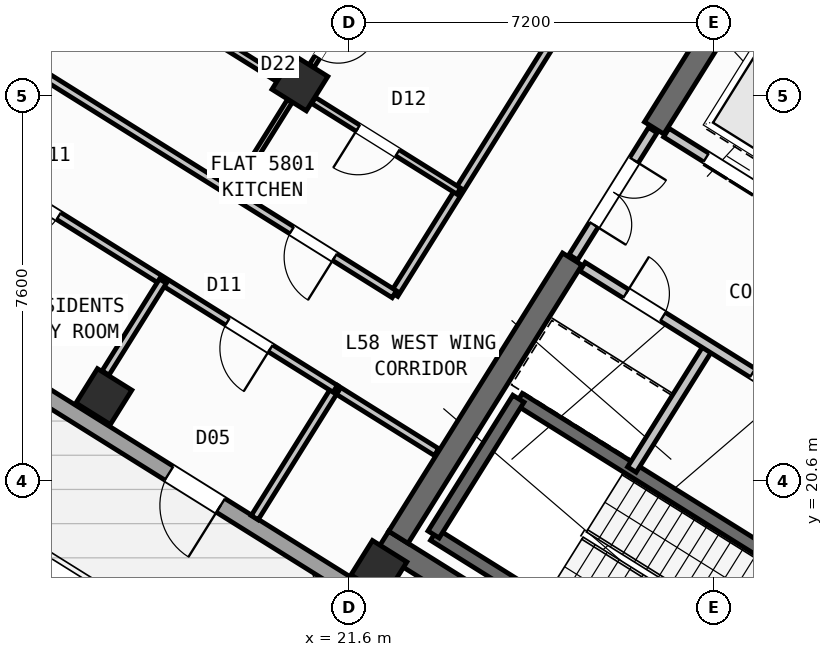
"""IFC4 building model, lengths in metres.
Left out: names, types, materials, properties, quantities, classifications, styles, units other than length and angle.
Written with IfcOpenShell. Run it as: python <this file> out.ifc"""

import sys

from ifc_helpers import new_model, si_unit, direction, frame, frame_2d, origin, origin_2d, place, context, subcontext, project, spatial, rectangle, hollow_rectangle, extrude, source, transform, mapped, element, fill, save


model = new_model("IFC4")
c1 = context("Model", 3, precision=1e-05, world=origin(), true_north=direction((0.0, 1.0)))
c2 = subcontext(c1, "Body", "Model", "MODEL_VIEW")
j1 = project(units=[si_unit("LENGTHUNIT", "METRE"), si_unit("PLANEANGLEUNIT", "RADIAN")], contexts=[c1])
p1 = place(None, origin())
s1 = spatial("IfcSite", under=j1, at=p1, CompositionType="ELEMENT")
p2 = place(p1, origin())
s2 = spatial("IfcBuilding", under=s1, at=p2, CompositionType="ELEMENT")
p3 = place(p2, frame((0.0, 0.0, 229.2)))
s3 = spatial("IfcBuildingStorey", under=s2, at=p3, CompositionType="ELEMENT", Elevation=229.2)
p4 = place(p3, frame((40.531, 24.036, 0.0), z_axis=(0.0, 0.0, 1.0), x_axis=(-0.848048787466, 0.529918157905, 0.0)))
e1 = element("IfcWall", 1, at=p4, inside=s3, PredefinedType="SHEAR", context=c2, shape_type="SweptSolid", body=[
    extrude(rectangle(XDim=13.04, YDim=0.45, at=frame_2d((6.52, 0.0))), origin(), (0.0, 0.0, 1.0), 4.22),
])
p5 = place(p3, frame((33.324, 12.503, 0.0), z_axis=(0.0, 0.0, 1.0), x_axis=(-0.848043529849, 0.529926571782, 0.0)))
e2 = element("IfcWall", 2, at=p5, inside=s3, PredefinedType="SHEAR", context=c2, shape_type="SweptSolid", body=[
    extrude(rectangle(XDim=13.04, YDim=0.45, at=frame_2d((6.52, 0.0))), origin(), (0.0, 0.0, 1.0), 4.22),
])
p6 = place(p3, frame((29.544, 30.636, 0.0), z_axis=(0.0, 0.0, 1.0), x_axis=(-0.529902075036, -0.848058836916, 0.0)))
e3 = element("IfcWall", 3, at=p6, inside=s3, PredefinedType="SHEAR", context=c2, shape_type="SweptSolid", body=[
    extrude(rectangle(XDim=3.625, YDim=0.45, at=frame_2d((1.812, 0.0))), origin(), (0.0, 0.0, 1.0), 4.22),
])
p7 = place(p3, frame((26.007, 24.976, 0.0), z_axis=(0.0, 0.0, 1.0), x_axis=(-0.529931155655, -0.848040665456, 0.0)))
e4 = element("IfcWall", 4, at=p7, inside=s3, PredefinedType="SHEAR", context=c2, shape_type="SweptSolid", body=[
    extrude(rectangle(XDim=6.475, YDim=0.45, at=frame_2d((3.238, 0.0))), origin(), (0.0, 0.0, 1.0), 4.22),
])
m1 = source(origin(), c2, "Body", "SweptSolid", [
    extrude(hollow_rectangle(XDim=0.8, YDim=0.8, WallThickness=0.032, at=origin_2d()), origin(), (0.0, 0.0, 1.0), 4.5),
])
for number, where, z_axis, x_axis in (
    (5, (22.191, 18.87, 0.0), (0.0, 0.0, 1.0), (-0.848, 0.53, 0.0)),
    (6, (20.632, 28.452, 0.0), (0.0, 0.0, 1.0), (-0.848, 0.53, 0.0)),
    (7, (16.764, 22.261, 0.0), (0.0, 0.0, 1.0), (-0.848, 0.53, 0.0)),
):
    element("IfcColumn", number, at=place(p3, frame(where, z_axis=z_axis, x_axis=x_axis)), inside=s3, PredefinedType="COLUMN", context=c2, shape_type="MappedRepresentation", body=[
        mapped(m1, transform((0.0, 0.0, 0.0), scale=1.0)),
    ])
p8 = place(p3, frame((31.76, 12.183, 0.0), z_axis=(0.0, 0.0, 1.0), x_axis=(-0.848047074256, 0.529920899612, 0.0)))
e8 = element("IfcWall", 8, at=p8, inside=s3, PredefinedType="STANDARD", context=c2, shape_type="SweptSolid", body=[
    extrude(rectangle(XDim=30.652, YDim=0.32, at=frame_2d((15.326, 0.0))), origin(), (0.0, 0.0, 1.0), 4.22),
])
p9 = place(p8, frame((14.966, 0.0, 0.0)))
e9 = element("IfcOpeningElement", 9, at=p9, cuts=e8, PredefinedType="OPENING", context=c2, shape_type="SweptSolid", body=[
    extrude(rectangle(XDim=1.2, YDim=2.15, at=frame_2d((0.6, 1.075))), frame((0.0, 0.17, 0.0), z_axis=(0.0, -1.0, 0.0), x_axis=(1.0, 0.0, 0.0)), (0.0, 0.0, 1.0), 0.34),
])
p10 = place(p8, frame((2.096, 0.0, 0.9)))
e10 = element("IfcOpeningElement", 10, at=p10, cuts=e8, PredefinedType="OPENING", context=c2, shape_type="SweptSolid", body=[
    extrude(rectangle(XDim=1.65, YDim=1.45, at=frame_2d((0.825, 0.725))), frame((0.0, 0.17, 0.0), z_axis=(0.0, -1.0, 0.0), x_axis=(1.0, 0.0, 0.0)), (0.0, 0.0, 1.0), 0.34),
])
p11 = place(p8, frame((6.771, 0.0, 0.9)))
e11 = element("IfcOpeningElement", 11, at=p11, cuts=e8, PredefinedType="OPENING", context=c2, shape_type="SweptSolid", body=[
    extrude(rectangle(XDim=1.65, YDim=1.45, at=frame_2d((0.825, 0.725))), frame((0.0, 0.17, 0.0), z_axis=(0.0, -1.0, 0.0), x_axis=(1.0, 0.0, 0.0)), (0.0, 0.0, 1.0), 0.34),
])
p12 = place(p8, frame((20.283, 0.0, 0.95)))
e12 = element("IfcOpeningElement", 12, at=p12, cuts=e8, PredefinedType="OPENING", context=c2, shape_type="SweptSolid", body=[
    extrude(rectangle(XDim=1.95, YDim=1.35, at=frame_2d((0.975, 0.675))), frame((0.0, 0.17, 0.0), z_axis=(0.0, -1.0, 0.0), x_axis=(1.0, 0.0, 0.0)), (0.0, 0.0, 1.0), 0.34),
])
p13 = place(p8, frame((27.208, 0.0, 1.0)))
e13 = element("IfcOpeningElement", 13, at=p13, cuts=e8, PredefinedType="OPENING", context=c2, shape_type="SweptSolid", body=[
    extrude(rectangle(XDim=0.9, YDim=1.25, at=frame_2d((0.45, 0.625))), frame((0.0, 0.17, 0.0), z_axis=(0.0, -1.0, 0.0), x_axis=(1.0, 0.0, 0.0)), (0.0, 0.0, 1.0), 0.34),
])
p14 = place(p3, frame((5.7, 28.71, 0.0), z_axis=(0.0, 0.0, 1.0), x_axis=(0.529923711467, 0.8480453172, 0.0)))
e14 = element("IfcWall", 14, at=p14, inside=s3, PredefinedType="STANDARD", context=c2, shape_type="SweptSolid", body=[
    extrude(rectangle(XDim=21.587, YDim=0.32, at=frame_2d((10.794, 0.0))), origin(), (0.0, 0.0, 1.0), 2.395),
])
p15 = place(p14, frame((5.859, 0.0, 1.0)))
e15 = element("IfcOpeningElement", 15, at=p15, cuts=e14, PredefinedType="OPENING", context=c2, shape_type="SweptSolid", body=[
    extrude(rectangle(XDim=0.9, YDim=1.25, at=frame_2d((0.45, 0.625))), frame((0.0, 0.17, 0.0), z_axis=(0.0, -1.0, 0.0), x_axis=(1.0, 0.0, 0.0)), (0.0, 0.0, 1.0), 0.34),
])
p16 = place(p14, frame((9.444, 0.0, 1.0)))
e16 = element("IfcOpeningElement", 16, at=p16, cuts=e14, PredefinedType="OPENING", context=c2, shape_type="SweptSolid", body=[
    extrude(rectangle(XDim=0.9, YDim=1.25, at=frame_2d((0.45, 0.625))), frame((0.0, 0.17, 0.0), z_axis=(0.0, -1.0, 0.0), x_axis=(1.0, 0.0, 0.0)), (0.0, 0.0, 1.0), 0.34),
])
p17 = place(p14, frame((12.344, 0.0, 1.0)))
e17 = element("IfcOpeningElement", 17, at=p17, cuts=e14, PredefinedType="OPENING", context=c2, shape_type="SweptSolid", body=[
    extrude(rectangle(XDim=0.9, YDim=1.25, at=frame_2d((0.45, 0.625))), frame((0.0, 0.17, 0.0), z_axis=(0.0, -1.0, 0.0), x_axis=(1.0, 0.0, 0.0)), (0.0, 0.0, 1.0), 0.34),
])
p18 = place(p14, frame((16.5, 0.0, 1.0)))
e18 = element("IfcOpeningElement", 18, at=p18, cuts=e14, PredefinedType="OPENING", context=c2, shape_type="SweptSolid", body=[
    extrude(rectangle(XDim=0.9, YDim=1.25, at=frame_2d((0.45, 0.625))), frame((0.0, 0.17, 0.0), z_axis=(0.0, -1.0, 0.0), x_axis=(1.0, 0.0, 0.0)), (0.0, 0.0, 1.0), 0.34),
])
p19 = place(p14, frame((18.913, 0.0, 1.0)))
e19 = element("IfcOpeningElement", 19, at=p19, cuts=e14, PredefinedType="OPENING", context=c2, shape_type="SweptSolid", body=[
    extrude(rectangle(XDim=0.9, YDim=1.25, at=frame_2d((0.45, 0.625))), frame((0.0, 0.17, 0.0), z_axis=(0.0, -1.0, 0.0), x_axis=(1.0, 0.0, 0.0)), (0.0, 0.0, 1.0), 0.34),
])
p20 = place(p3, frame((29.605, 15.581, 0.0), z_axis=(0.0, 0.0, 1.0), x_axis=(-0.848036911448, 0.529937163087, 0.0)))
e20 = element("IfcWall", 20, at=p20, inside=s3, PredefinedType="SHEAR", context=c2, shape_type="SweptSolid", body=[
    extrude(rectangle(XDim=7.46, YDim=0.26, at=frame_2d((3.73, 0.0))), origin(), (0.0, 0.0, 1.0), 4.22),
])
p21 = place(p3, frame((31.28, 18.261, 0.0), z_axis=(0.0, 0.0, 1.0), x_axis=(-0.848051618787, 0.529913626805, 0.0)))
e21 = element("IfcWall", 21, at=p21, inside=s3, PredefinedType="SHEAR", context=c2, shape_type="SweptSolid", body=[
    extrude(rectangle(XDim=7.46, YDim=0.26, at=frame_2d((3.73, 0.0))), origin(), (0.0, 0.0, 1.0), 4.22),
])
p22 = place(p21, frame((0.36, 0.0, 0.0)))
e22 = element("IfcOpeningElement", 22, at=p22, cuts=e21, PredefinedType="OPENING", context=c2, shape_type="SweptSolid", body=[
    extrude(rectangle(XDim=0.86, YDim=2.05, at=frame_2d((0.43, 1.025))), frame((0.0, 0.14, 0.0), z_axis=(0.0, -1.0, 0.0), x_axis=(1.0, 0.0, 0.0)), (0.0, 0.0, 1.0), 0.28),
])
p23 = place(p3, frame((24.945, 22.22, 0.0), z_axis=(0.0, 0.0, 1.0), x_axis=(-0.529908658664, -0.84805472316, 0.0)))
e23 = element("IfcWall", 23, at=p23, inside=s3, PredefinedType="SHEAR", context=c2, shape_type="SweptSolid", body=[
    extrude(rectangle(XDim=3.16, YDim=0.26, at=frame_2d((1.58, 0.0))), origin(), (0.0, 0.0, 1.0), 4.22),
])
p24 = place(p3, frame((31.822, 24.998, 0.0), z_axis=(0.0, 0.0, 1.0), x_axis=(-0.848054125777, 0.529909614701, 0.0)))
e24 = element("IfcWall", 24, at=p24, inside=s3, PredefinedType="STANDARD", context=c2, shape_type="SweptSolid", body=[
    extrude(rectangle(XDim=4.668, YDim=0.2, at=frame_2d((2.334, 0.0))), origin(), (0.0, 0.0, 1.0), 4.21),
])
p25 = place(p24, frame((0.52, 0.0, 0.0)))
e25 = element("IfcOpeningElement", 25, at=p25, cuts=e24, PredefinedType="OPENING", context=c2, shape_type="SweptSolid", body=[
    extrude(rectangle(XDim=1.2, YDim=2.15, at=frame_2d((0.6, 1.075))), frame((0.0, 0.11, 0.0), z_axis=(0.0, -1.0, 0.0), x_axis=(1.0, 0.0, 0.0)), (0.0, 0.0, 1.0), 0.22),
])
p26 = place(p24, frame((2.54, 0.0, 0.0)))
e26 = element("IfcOpeningElement", 26, at=p26, cuts=e24, PredefinedType="OPENING", context=c2, shape_type="SweptSolid", body=[
    extrude(rectangle(XDim=1.2, YDim=2.15, at=frame_2d((0.6, 1.075))), frame((0.0, 0.11, 0.0), z_axis=(0.0, -1.0, 0.0), x_axis=(1.0, 0.0, 0.0)), (0.0, 0.0, 1.0), 0.22),
])
p27 = place(p3, frame((33.363, 27.69, 0.0), z_axis=(0.0, 0.0, 1.0), x_axis=(-0.84804957148, 0.529916903215, 0.0)))
e27 = element("IfcWall", 27, at=p27, inside=s3, PredefinedType="STANDARD", context=c2, shape_type="SweptSolid", body=[
    extrude(rectangle(XDim=4.548, YDim=0.2, at=frame_2d((2.274, 0.0))), origin(), (0.0, 0.0, 1.0), 4.21),
])
p28 = place(p3, frame((28.71, 23.263, 0.0), z_axis=(0.0, 0.0, 1.0), x_axis=(-0.529907497854, -0.848055448493, 0.0)))
e28 = element("IfcWall", 28, at=p28, inside=s3, PredefinedType="STANDARD", context=c2, shape_type="SweptSolid", body=[
    extrude(rectangle(XDim=2.88, YDim=0.2, at=frame_2d((1.44, 0.0))), origin(), (0.0, 0.0, 1.0), 4.21),
])
p29 = place(p3, frame((31.525, 21.504, 0.0), z_axis=(0.0, 0.0, 1.0), x_axis=(-0.848042066329, 0.529928913853, 0.0)))
e29 = element("IfcWall", 29, at=p29, inside=s3, PredefinedType="STANDARD", context=c2, shape_type="SweptSolid", body=[
    extrude(rectangle(XDim=6.268, YDim=0.2, at=frame_2d((3.134, 0.0))), origin(), (0.0, 0.0, 1.0), 4.21),
])
p30 = place(p29, frame((4.4, 0.0, 0.0)))
e30 = element("IfcOpeningElement", 30, at=p30, cuts=e29, PredefinedType="OPENING", context=c2, shape_type="SweptSolid", body=[
    extrude(rectangle(XDim=0.86, YDim=2.05, at=frame_2d((0.43, 1.025))), frame((0.0, 0.11, 0.0), z_axis=(0.0, -1.0, 0.0), x_axis=(1.0, 0.0, 0.0)), (0.0, 0.0, 1.0), 0.22),
])
p31 = place(p29, frame((1.45, 0.0, 0.0)))
e31 = element("IfcOpeningElement", 31, at=p31, cuts=e29, PredefinedType="OPENING", context=c2, shape_type="SweptSolid", body=[
    extrude(rectangle(XDim=0.86, YDim=2.05, at=frame_2d((0.43, 1.025))), frame((0.0, 0.11, 0.0), z_axis=(0.0, -1.0, 0.0), x_axis=(1.0, 0.0, 0.0)), (0.0, 0.0, 1.0), 0.22),
])
p32 = place(p3, frame((27.596, 27.52, 0.0), z_axis=(0.0, 0.0, 1.0), x_axis=(-0.529865479138, -0.848081702443, 0.0)))
e32 = element("IfcWall", 32, at=p32, inside=s3, PredefinedType="STANDARD", context=c2, shape_type="SweptSolid", body=[
    extrude(rectangle(XDim=2.96, YDim=0.2, at=frame_2d((1.48, 0.0))), origin(), (0.0, 0.0, 1.0), 2.395),
])
p33 = place(p32, frame((0.7, 0.0, 0.0)))
e33 = element("IfcOpeningElement", 33, at=p33, cuts=e32, PredefinedType="OPENING", context=c2, shape_type="SweptSolid", body=[
    extrude(rectangle(XDim=1.5, YDim=2.15, at=frame_2d((0.75, 1.075))), frame((0.0, 0.11, 0.0), z_axis=(0.0, -1.0, 0.0), x_axis=(1.0, 0.0, 0.0)), (0.0, 0.0, 1.0), 0.22),
])
p34 = place(p3, frame((23.329, 21.166, 0.0), z_axis=(0.0, 0.0, 1.0), x_axis=(-0.848033204961, 0.529943094382, 0.0)))
e34 = element("IfcWall", 34, at=p34, inside=s3, PredefinedType="PARTITIONING", context=c2, shape_type="SweptSolid", body=[
    extrude(rectangle(XDim=2.358, YDim=0.16, at=frame_2d((1.179, 0.0))), origin(), (0.0, 0.0, 1.0), 4.21),
])
p35 = place(p3, frame((31.239, 38.274, 0.0), z_axis=(0.0, 0.0, 1.0), x_axis=(-0.529921796515, -0.848046513806, 0.0)))
e35 = element("IfcWall", 35, at=p35, inside=s3, PredefinedType="PARTITIONING", context=c2, shape_type="SweptSolid", body=[
    extrude(rectangle(XDim=16.5, YDim=0.16, at=frame_2d((8.25, 0.0))), origin(), (0.0, 0.0, 1.0), 4.21),
])
p36 = place(p3, frame((21.329, 22.416, 0.0), z_axis=(0.0, 0.0, 1.0), x_axis=(-0.529933104572, -0.848039447596, 0.0)))
e36 = element("IfcWall", 36, at=p36, inside=s3, PredefinedType="PARTITIONING", context=c2, shape_type="SweptSolid", body=[
    extrude(rectangle(XDim=3.0, YDim=0.16, at=frame_2d((1.5, 0.0))), origin(), (0.0, 0.0, 1.0), 4.21),
])
p37 = place(p3, frame((22.495, 24.281, 0.0), z_axis=(0.0, 0.0, 1.0), x_axis=(-0.848052408131, 0.529912363569, 0.0)))
e37 = element("IfcWall", 37, at=p37, inside=s3, PredefinedType="PARTITIONING", context=c2, shape_type="SweptSolid", body=[
    extrude(rectangle(XDim=16.73, YDim=0.16, at=frame_2d((8.365, 0.0))), origin(), (0.0, 0.0, 1.0), 4.21),
])
p38 = place(p37, frame((1.385, 0.0, 0.0)))
e38 = element("IfcOpeningElement", 38, at=p38, cuts=e37, PredefinedType="OPENING", context=c2, shape_type="SweptSolid", body=[
    extrude(rectangle(XDim=1.0, YDim=2.1, at=frame_2d((0.5, 1.05))), frame((0.0, 0.09, 0.0), z_axis=(0.0, -1.0, 0.0), x_axis=(1.0, 0.0, 0.0)), (0.0, 0.0, 1.0), 0.18),
])
p39 = place(p37, frame((14.76, 0.0, 0.0)))
e39 = element("IfcOpeningElement", 39, at=p39, cuts=e37, PredefinedType="OPENING", context=c2, shape_type="SweptSolid", body=[
    extrude(rectangle(XDim=1.0, YDim=2.1, at=frame_2d((0.5, 1.05))), frame((0.0, 0.09, 0.0), z_axis=(0.0, -1.0, 0.0), x_axis=(1.0, 0.0, 0.0)), (0.0, 0.0, 1.0), 0.18),
])
p40 = place(p3, frame((21.329, 22.416, 0.0), z_axis=(0.0, 0.0, 1.0), x_axis=(-0.848052408131, 0.529912363569, 0.0)))
e40 = element("IfcWall", 40, at=p40, inside=s3, PredefinedType="PARTITIONING", context=c2, shape_type="SweptSolid", body=[
    extrude(rectangle(XDim=16.73, YDim=0.16, at=frame_2d((8.365, 0.0))), origin(), (0.0, 0.0, 1.0), 4.21),
])
p41 = place(p40, frame((1.505, 0.0, 0.0)))
e41 = element("IfcOpeningElement", 41, at=p41, cuts=e40, PredefinedType="OPENING", context=c2, shape_type="SweptSolid", body=[
    extrude(rectangle(XDim=1.0, YDim=2.1, at=frame_2d((0.5, 1.05))), frame((0.0, 0.09, 0.0), z_axis=(0.0, -1.0, 0.0), x_axis=(1.0, 0.0, 0.0)), (0.0, 0.0, 1.0), 0.18),
])
p42 = place(p40, frame((6.435, 0.0, 0.0)))
e42 = element("IfcOpeningElement", 42, at=p42, cuts=e40, PredefinedType="OPENING", context=c2, shape_type="SweptSolid", body=[
    extrude(rectangle(XDim=1.0, YDim=2.1, at=frame_2d((0.5, 1.05))), frame((0.0, 0.09, 0.0), z_axis=(0.0, -1.0, 0.0), x_axis=(1.0, 0.0, 0.0)), (0.0, 0.0, 1.0), 0.18),
])
p43 = place(p40, frame((12.784, 0.0, 0.0)))
e43 = element("IfcOpeningElement", 43, at=p43, cuts=e40, PredefinedType="OPENING", context=c2, shape_type="SweptSolid", body=[
    extrude(rectangle(XDim=1.0, YDim=2.1, at=frame_2d((0.5, 1.05))), frame((0.0, 0.09, 0.0), z_axis=(0.0, -1.0, 0.0), x_axis=(1.0, 0.0, 0.0)), (0.0, 0.0, 1.0), 0.18),
])
p44 = place(p3, frame((17.928, 24.541, 0.0), z_axis=(0.0, 0.0, 1.0), x_axis=(-0.529844966244, -0.848094518167, 0.0)))
e44 = element("IfcWall", 44, at=p44, inside=s3, PredefinedType="PARTITIONING", context=c2, shape_type="SweptSolid", body=[
    extrude(rectangle(XDim=2.138, YDim=0.16, at=frame_2d((1.069, 0.0))), origin(), (0.0, 0.0, 1.0), 2.395),
])
p45 = place(p3, frame((24.299, 34.283, 0.0), z_axis=(0.0, 0.0, 1.0), x_axis=(-0.529890499457, -0.848066069705, 0.0)))
e45 = element("IfcWall", 45, at=p45, inside=s3, PredefinedType="PARTITIONING", context=c2, shape_type="SweptSolid", body=[
    extrude(rectangle(XDim=6.476, YDim=0.11, at=frame_2d((3.238, 0.0))), origin(), (0.0, 0.0, 1.0), 2.395),
])
p46 = place(p45, frame((5.496, 0.0, 0.0)))
e46 = element("IfcOpeningElement", 46, at=p46, cuts=e45, PredefinedType="OPENING", context=c2, shape_type="SweptSolid", body=[
    extrude(rectangle(XDim=0.78, YDim=2.05, at=frame_2d((0.39, 1.025))), frame((0.0, 0.065, 0.0), z_axis=(0.0, -1.0, 0.0), x_axis=(1.0, 0.0, 0.0)), (0.0, 0.0, 1.0), 0.13),
])
p47 = place(p3, frame((20.431, 28.092, 0.0), z_axis=(0.0, 0.0, 1.0), x_axis=(-0.529978410432, -0.848011134641, 0.0)))
e47 = element("IfcWall", 47, at=p47, inside=s3, PredefinedType="PARTITIONING", context=c2, shape_type="SweptSolid", body=[
    extrude(rectangle(XDim=2.138, YDim=0.11, at=frame_2d((1.069, 0.0))), origin(), (0.0, 0.0, 1.0), 2.395),
])
p48 = place(p3, frame((23.767, 26.316, 0.0), z_axis=(0.0, 0.0, 1.0), x_axis=(-0.848055143312, 0.529907986259, 0.0)))
e48 = element("IfcWall", 48, at=p48, inside=s3, PredefinedType="PLUMBINGWALL", context=c2, shape_type="SweptSolid", body=[
    extrude(rectangle(XDim=3.378, YDim=0.14, at=frame_2d((1.689, 0.0))), origin(), (0.0, 0.0, 1.0), 3.745),
])
p49 = place(p48, frame((1.425, 0.0, 0.0)))
e49 = element("IfcOpeningElement", 49, at=p49, cuts=e48, PredefinedType="OPENING", context=c2, shape_type="SweptSolid", body=[
    extrude(rectangle(XDim=0.92, YDim=2.08, at=frame_2d((0.46, 1.04))), frame((0.0, 0.08, 0.0), z_axis=(0.0, -1.0, 0.0), x_axis=(1.0, 0.0, 0.0)), (0.0, 0.0, 1.0), 0.16),
])
p50 = place(p3, frame((20.203, 28.543, 0.0), z_axis=(0.0, 0.0, 1.0), x_axis=(-0.848049955116, 0.529916289265, 0.0)))
e50 = element("IfcWall", 50, at=p50, inside=s3, PredefinedType="PLUMBINGWALL", context=c2, shape_type="SweptSolid", body=[
    extrude(rectangle(XDim=5.576, YDim=0.14, at=frame_2d((2.788, 0.0))), origin(), (0.0, 0.0, 1.0), 3.745),
])
p51 = place(p50, frame((2.338, 0.0, 0.0)))
e51 = element("IfcOpeningElement", 51, at=p51, cuts=e50, PredefinedType="OPENING", context=c2, shape_type="SweptSolid", body=[
    extrude(rectangle(XDim=0.78, YDim=2.05, at=frame_2d((0.39, 1.025))), frame((0.0, 0.08, 0.0), z_axis=(0.0, -1.0, 0.0), x_axis=(1.0, 0.0, 0.0)), (0.0, 0.0, 1.0), 0.16),
])
p52 = place(p3, frame((41.936, 26.012, 0.0), z_axis=(0.0, 0.0, 1.0), x_axis=(-0.848051154596, 0.529914369676, 0.0)))
e52 = element("IfcWall", 52, at=p52, inside=s3, PredefinedType="PARTITIONING", context=c2, shape_type="SweptSolid", body=[
    extrude(rectangle(XDim=15.57, YDim=0.16, at=frame_2d((7.785, 0.0))), origin(), (0.0, 0.0, 1.0), 4.21),
])
p53 = place(p52, frame((10.83, 0.0, 0.0)))
e53 = element("IfcOpeningElement", 53, at=p53, cuts=e52, PredefinedType="OPENING", context=c2, shape_type="SweptSolid", body=[
    extrude(rectangle(XDim=1.0, YDim=2.1, at=frame_2d((0.5, 1.05))), frame((0.0, 0.09, 0.0), z_axis=(0.0, -1.0, 0.0), x_axis=(1.0, 0.0, 0.0)), (0.0, 0.0, 1.0), 0.18),
])
m2 = source(origin(), c2, "Body", "SweptSolid", [
    extrude(rectangle(XDim=1.2, YDim=2.15, at=frame_2d((0.6, 1.075))), frame((0.0, 0.025, 0.0), z_axis=(0.0, -1.0, 0.0), x_axis=(1.0, 0.0, 0.0)), (0.0, 0.0, 1.0), 0.05),
])
p54 = place(p9, origin())
e54 = element("IfcDoor", 54, at=p54, inside=s3, OperationType="SINGLE_SWING_LEFT", PredefinedType="DOOR", context=c2, shape_type="MappedRepresentation", body=[
    mapped(m2, transform((0.0, 0.0, 0.0), scale=1.0)),
])
fill(e9, e54)
p55 = place(p26, origin())
e55 = element("IfcDoor", 55, at=p55, inside=s3, OperationType="DOUBLE_DOOR_SLIDING", PredefinedType="DOOR", context=c2, shape_type="MappedRepresentation", body=[
    mapped(m2, transform((0.0, 0.0, 0.0), scale=1.0)),
])
fill(e26, e55)
m3 = source(origin(), c2, "Body", "SweptSolid", [
    extrude(rectangle(XDim=0.86, YDim=2.05, at=frame_2d((0.43, 1.025))), frame((0.0, 0.025, 0.0), z_axis=(0.0, -1.0, 0.0), x_axis=(1.0, 0.0, 0.0)), (0.0, 0.0, 1.0), 0.05),
])
p56 = place(p30, frame((0.86, 0.0, 0.0), z_axis=(0.0, 0.0, 1.0), x_axis=(-1.0, 0.0, 0.0)))
e56 = element("IfcDoor", 56, at=p56, inside=s3, OperationType="SINGLE_SWING_LEFT", PredefinedType="DOOR", context=c2, shape_type="MappedRepresentation", body=[
    mapped(m3, transform((0.0, 0.0, 0.0), scale=1.0)),
])
fill(e30, e56)
p57 = place(p31, frame((0.86, 0.0, 0.0), z_axis=(0.0, 0.0, 1.0), x_axis=(-1.0, 0.0, 0.0)))
e57 = element("IfcDoor", 57, at=p57, inside=s3, OperationType="SINGLE_SWING_RIGHT", PredefinedType="DOOR", context=c2, shape_type="MappedRepresentation", body=[
    mapped(m3, transform((0.0, 0.0, 0.0), scale=1.0)),
])
fill(e31, e57)
m4 = source(origin(), c2, "Body", "SweptSolid", [
    extrude(rectangle(XDim=1.5, YDim=2.15, at=frame_2d((0.75, 1.075))), frame((0.0, 0.025, 0.0), z_axis=(0.0, -1.0, 0.0), x_axis=(1.0, 0.0, 0.0)), (0.0, 0.0, 1.0), 0.05),
])
p58 = place(p33, origin())
e58 = element("IfcDoor", 58, at=p58, inside=s3, OperationType="DOUBLE_DOOR_SINGLE_SWING", PredefinedType="DOOR", context=c2, shape_type="MappedRepresentation", body=[
    mapped(m4, transform((0.0, 0.0, 0.0), scale=1.0)),
])
fill(e33, e58)
m5 = source(origin(), c2, "Body", "SweptSolid", [
    extrude(rectangle(XDim=1.0, YDim=2.1, at=frame_2d((0.5, 1.05))), frame((0.0, 0.025, 0.0), z_axis=(0.0, -1.0, 0.0), x_axis=(1.0, 0.0, 0.0)), (0.0, 0.0, 1.0), 0.05),
])
p59 = place(p41, origin())
e59 = element("IfcDoor", 59, at=p59, inside=s3, OperationType="SINGLE_SWING_LEFT", PredefinedType="DOOR", context=c2, shape_type="MappedRepresentation", body=[
    mapped(m5, transform((0.0, 0.0, 0.0), scale=1.0)),
])
fill(e41, e59)
p60 = place(p42, origin())
e60 = element("IfcDoor", 60, at=p60, inside=s3, OperationType="SINGLE_SWING_RIGHT", PredefinedType="DOOR", context=c2, shape_type="MappedRepresentation", body=[
    mapped(m5, transform((0.0, 0.0, 0.0), scale=1.0)),
])
fill(e42, e60)
p61 = place(p38, origin())
e61 = element("IfcDoor", 61, at=p61, inside=s3, OperationType="SINGLE_SWING_LEFT", PredefinedType="DOOR", context=c2, shape_type="MappedRepresentation", body=[
    mapped(m5, transform((0.0, 0.0, 0.0), scale=1.0)),
])
fill(e38, e61)
m6 = source(origin(), c2, "Body", "SweptSolid", [
    extrude(rectangle(XDim=0.92, YDim=2.08, at=frame_2d((0.46, 1.04))), frame((0.0, 0.025, 0.0), z_axis=(0.0, -1.0, 0.0), x_axis=(1.0, 0.0, 0.0)), (0.0, 0.0, 1.0), 0.05),
])
p62 = place(p49, origin())
e62 = element("IfcDoor", 62, at=p62, inside=s3, OperationType="SINGLE_SWING_RIGHT", PredefinedType="DOOR", context=c2, shape_type="MappedRepresentation", body=[
    mapped(m6, transform((0.0, 0.0, 0.0), scale=1.0)),
])
fill(e49, e62)
m7 = source(origin(), c2, "Body", "SweptSolid", [
    extrude(rectangle(XDim=0.78, YDim=2.05, at=frame_2d((0.39, 1.025))), frame((0.0, 0.025, 0.0), z_axis=(0.0, -1.0, 0.0), x_axis=(1.0, 0.0, 0.0)), (0.0, 0.0, 1.0), 0.05),
])
p63 = place(p46, origin())
e63 = element("IfcDoor", 63, at=p63, inside=s3, OperationType="SINGLE_SWING_LEFT", PredefinedType="DOOR", context=c2, shape_type="MappedRepresentation", body=[
    mapped(m7, transform((0.0, 0.0, 0.0), scale=1.0)),
])
fill(e46, e63)
save(model, sys.argv[1])
